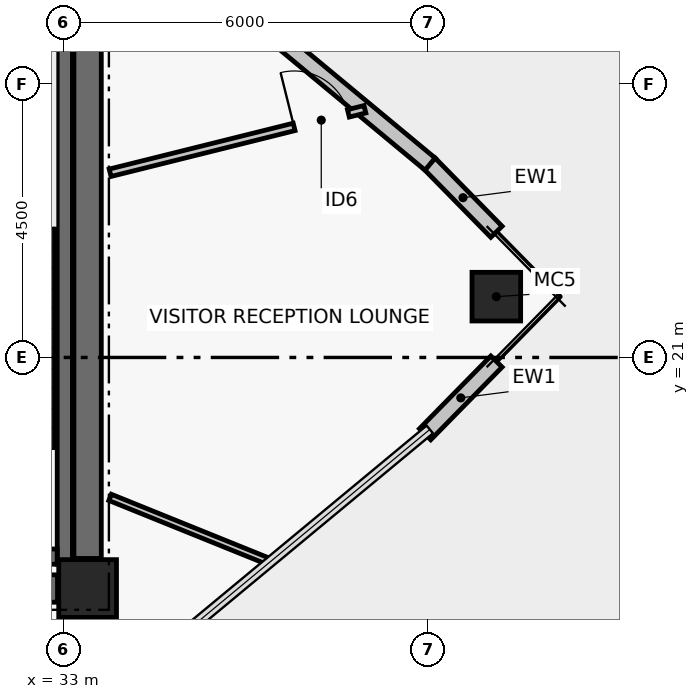
"""IFC4 building model, lengths in metres.
Left out: names, types, materials, properties, quantities, classifications, styles, units other than length and angle.
Written with IfcOpenShell. Run it as: python <this file> out.ifc"""

import sys

from ifc_helpers import new_model, si_unit, direction, frame, frame_2d, origin, origin_2d, place, context, subcontext, project, spatial, rectangle, hollow_rectangle, extrude, element, fill, save


model = new_model("IFC4")
c1 = context("Model", 3, precision=1e-05, world=origin(), true_north=direction((0.0, 1.0)))
c2 = subcontext(c1, "Body", "Model", "MODEL_VIEW")
j1 = project(units=[si_unit("LENGTHUNIT", "METRE"), si_unit("PLANEANGLEUNIT", "RADIAN")], contexts=[c1])
p1 = place(None, origin())
s1 = spatial("IfcSite", under=j1, at=p1, CompositionType="ELEMENT")
p2 = place(p1, origin())
s2 = spatial("IfcBuilding", under=s1, at=p2, CompositionType="ELEMENT")
p3 = place(p2, frame((0.0, 0.0, 247.14)))
s3 = spatial("IfcBuildingStorey", under=s2, at=p3, CompositionType="ELEMENT", Elevation=247.14)
p4 = place(p3, frame((33.4, 17.2, 0.0), z_axis=(0.0, 0.0, 1.0), x_axis=(1.0, 0.0, 0.0)))
e1 = element("IfcColumn", 1, at=p4, inside=s3, PredefinedType="COLUMN", context=c2, shape_type="SweptSolid", body=[
    extrude(rectangle(XDim=0.95, YDim=0.95, at=origin_2d()), origin(), (0.0, 0.0, 1.0), 3.72),
])
p5 = place(p3, frame((29.645, 17.2, 0.0), z_axis=(0.0, 0.0, 1.0), x_axis=(1.0, 0.0, 0.0)))
e2 = element("IfcWall", 2, at=p5, inside=s3, PredefinedType="SHEAR", context=c2, shape_type="SweptSolid", body=[
    extrude(rectangle(XDim=3.26, YDim=0.45, at=frame_2d((1.63, 0.0))), origin(), (0.0, 0.0, 1.0), 3.5),
])
p6 = place(p3, frame((33.4, 17.695, 0.0), z_axis=(0.0, 0.0, 1.0), x_axis=(0.0, 1.0, 0.0)))
e3 = element("IfcWall", 3, at=p6, inside=s3, PredefinedType="SHEAR", context=c2, shape_type="SweptSolid", body=[
    extrude(rectangle(XDim=8.61, YDim=0.45, at=frame_2d((4.305, 0.0))), origin(), (0.0, 0.0, 1.0), 3.5),
])
p7 = place(p3, frame((33.025, 17.6, 0.0), z_axis=(0.0, 0.0, 1.0), x_axis=(0.0, 1.0, 0.0)))
e4 = element("IfcWall", 4, at=p7, inside=s3, PredefinedType="SHEAR", context=c2, shape_type="SweptSolid", body=[
    extrude(rectangle(XDim=8.8, YDim=0.25, at=frame_2d((4.4, 0.0))), origin(), (0.0, 0.0, 1.0), 3.5),
])
p8 = place(p3, frame((29.4, 17.725, 0.0), z_axis=(0.0, 0.0, 1.0), x_axis=(1.0, 0.0, 0.0)))
e5 = element("IfcWall", 5, at=p8, inside=s3, PredefinedType="SHEAR", context=c2, shape_type="SweptSolid", body=[
    extrude(rectangle(XDim=3.5, YDim=0.25, at=frame_2d((1.75, 0.0))), origin(), (0.0, 0.0, 1.0), 3.5),
])
p9 = place(p3, frame((40.122, 22.0, 0.0), z_axis=(0.0, 0.0, 1.0), x_axis=(1.0, 0.0, 0.0)))
e6 = element("IfcColumn", 6, at=p9, inside=s3, PredefinedType="COLUMN", context=c2, shape_type="SweptSolid", body=[
    extrude(hollow_rectangle(XDim=0.8, YDim=0.8, WallThickness=0.035, at=origin_2d()), origin(), (0.0, 0.0, 1.0), 3.72),
])
p10 = place(p3, frame((40.124, 20.933, 0.0), z_axis=(0.0, 0.0, 1.0), x_axis=(-0.700517209169, -0.713635508966, 0.0)))
e7 = element("IfcWall", 7, at=p10, inside=s3, PredefinedType="PARTITIONING", context=c2, shape_type="SweptSolid", body=[
    extrude(rectangle(XDim=1.675, YDim=0.26, at=frame_2d((0.837, 0.0))), origin(), (0.0, 0.0, 1.0), 3.5),
])
p11 = place(p3, frame((39.024, 24.188, 0.0), z_axis=(0.0, 0.0, 1.0), x_axis=(0.700470648387, -0.71368121087, 0.0)))
e8 = element("IfcWall", 8, at=p11, inside=s3, PredefinedType="PARTITIONING", context=c2, shape_type="SweptSolid", body=[
    extrude(rectangle(XDim=1.571, YDim=0.26, at=frame_2d((0.785, 0.0))), origin(), (0.0, 0.0, 1.0), 3.5),
])
p12 = place(p3, frame((34.295, 28.108, 0.0), z_axis=(0.0, 0.0, 1.0), x_axis=(0.769779830138, -0.638309496337, 0.0)))
e9 = element("IfcWall", 9, at=p12, inside=s3, PredefinedType="PARTITIONING", context=c2, shape_type="SweptSolid", body=[
    extrude(rectangle(XDim=6.154, YDim=0.26, at=frame_2d((3.077, 0.0))), origin(), (0.0, 0.0, 1.0), 3.5),
])
p13 = place(p3, frame((33.77, 24.037, 0.0), z_axis=(0.0, 0.0, 1.0), x_axis=(0.970305215228, 0.241883834312, 0.0)))
e10 = element("IfcWall", 10, at=p13, inside=s3, PredefinedType="PARTITIONING", context=c2, shape_type="SweptSolid", body=[
    extrude(rectangle(XDim=4.319, YDim=0.125, at=frame_2d((2.159, 0.0))), origin(), (0.0, 0.0, 1.0), 2.63),
])
p14 = place(p13, frame((3.119, 0.0, 0.0)))
e11 = element("IfcOpeningElement", 11, at=p14, cuts=e10, PredefinedType="OPENING", context=c2, shape_type="SweptSolid", body=[
    extrude(rectangle(XDim=0.92, YDim=2.05, at=frame_2d((0.46, 1.025))), frame((0.0, 0.073, 0.0), z_axis=(0.0, -1.0, 0.0), x_axis=(1.0, 0.0, 0.0)), (0.0, 0.0, 1.0), 0.145),
])
p15 = place(p3, frame((33.77, 18.699, 0.0), z_axis=(0.0, 0.0, 1.0), x_axis=(0.92715823081, -0.374670008197, 0.0)))
e12 = element("IfcWall", 12, at=p15, inside=s3, PredefinedType="PARTITIONING", context=c2, shape_type="SweptSolid", body=[
    extrude(rectangle(XDim=2.848, YDim=0.11, at=frame_2d((1.424, 0.0))), origin(), (0.0, 0.0, 1.0), 2.63),
])
p16 = place(p14, origin())
e13 = element("IfcDoor", 13, at=p16, inside=s3, OperationType="SINGLE_SWING_LEFT", PredefinedType="DOOR", context=c2, shape_type="SweptSolid", body=[
    extrude(rectangle(XDim=0.92, YDim=2.05, at=frame_2d((0.46, 1.025))), frame((0.0, 0.025, 0.0), z_axis=(0.0, -1.0, 0.0), x_axis=(1.0, 0.0, 0.0)), (0.0, 0.0, 1.0), 0.05),
])
fill(e11, e13)
save(model, sys.argv[1])
